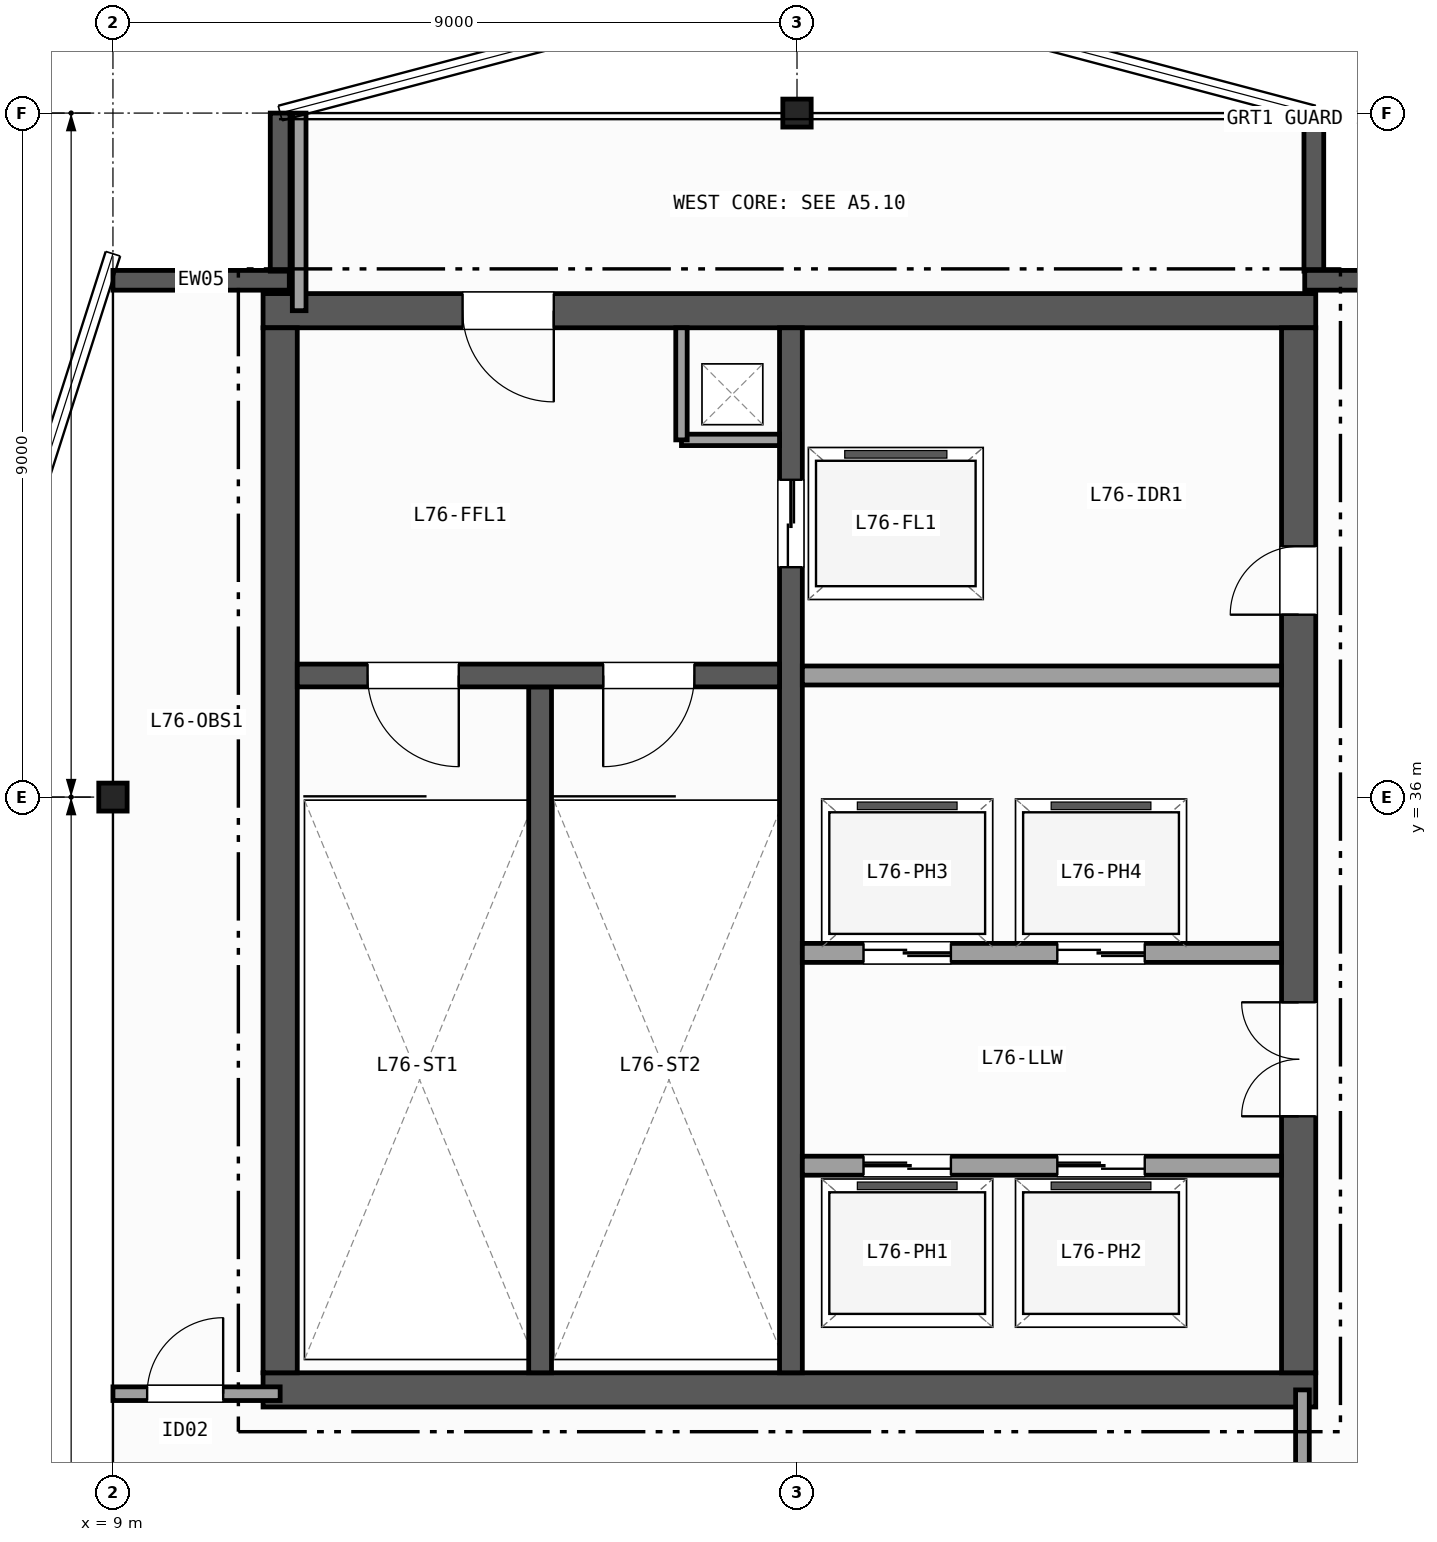
"""IFC4 building model, lengths in metres.
Left out: names, types, materials, properties, quantities, classifications, styles, units other than length and angle.
Written with IfcOpenShell. Run it as: python <this file> out.ifc"""

import sys

from ifc_helpers import new_model, si_unit, direction, frame, frame_2d, origin, origin_2d, place, context, subcontext, project, spatial, rectangle, i_section, extrude, element, fill, save


model = new_model("IFC4")
c1 = context("Model", 3, precision=1e-05, world=origin(), true_north=direction((0.0, 1.0)))
c2 = subcontext(c1, "Body", "Model", "MODEL_VIEW")
j1 = project(units=[si_unit("LENGTHUNIT", "METRE"), si_unit("PLANEANGLEUNIT", "RADIAN")], contexts=[c1])
p1 = place(None, origin())
s1 = spatial("IfcSite", under=j1, at=p1, CompositionType="ELEMENT")
p2 = place(p1, origin())
s2 = spatial("IfcBuilding", under=s1, at=p2, CompositionType="ELEMENT")
p3 = place(p2, frame((0.0, 0.0, 302.6)))
s3 = spatial("IfcBuildingStorey", under=s2, at=p3, CompositionType="ELEMENT", Elevation=302.6)
for number, where, z_axis, x_axis in (
    (1, (9.0, 36.0, 0.0), (0.0, 0.0, 1.0), (1.0, 0.0, 0.0)),
    (2, (18.0, 45.0, 0.0), (0.0, 0.0, 1.0), (1.0, 0.0, 0.0)),
):
    element("IfcColumn", number, at=place(p3, frame(where, z_axis=z_axis, x_axis=x_axis)), inside=s3, PredefinedType="COLUMN", context=c2, shape_type="SweptSolid", body=[
        extrude(i_section(OverallWidth=0.373, OverallDepth=0.368, WebThickness=0.015, FlangeThickness=0.024, FilletRadius=0.015, at=origin_2d()), origin(), (0.0, 0.0, 1.0), 5.2),
    ])
p4 = place(p3, frame((9.0, 42.8, 0.0), z_axis=(0.0, 0.0, 1.0), x_axis=(1.0, 0.0, 0.0)))
e3 = element("IfcWall", 3, at=p4, inside=s3, PredefinedType="SOLIDWALL", context=c2, shape_type="SweptSolid", body=[
    extrude(rectangle(XDim=2.32, YDim=0.26, at=frame_2d((1.16, 0.0))), origin(), (0.0, 0.0, 1.0), 4.9),
])
for number, where, z_axis, x_axis in (
    (4, (11.2, 42.92, 0.0), (0.0, 0.0, 1.0), (0.0, 1.0, 0.0)),
    (5, (24.8, 45.0, 0.0), (0.0, 0.0, 1.0), (0.0, -1.0, 0.0)),
):
    element("IfcWall", number, at=place(p3, frame(where, z_axis=z_axis, x_axis=x_axis)), inside=s3, PredefinedType="SOLIDWALL", context=c2, shape_type="SweptSolid", body=[
        extrude(rectangle(XDim=2.08, YDim=0.26, at=frame_2d((1.04, 0.0))), origin(), (0.0, 0.0, 1.0), 4.9),
    ])
p5 = place(p3, frame((24.68, 42.8, 0.0), z_axis=(0.0, 0.0, 1.0), x_axis=(1.0, 0.0, 0.0)))
e6 = element("IfcWall", 6, at=p5, inside=s3, PredefinedType="SOLIDWALL", context=c2, shape_type="SweptSolid", body=[
    extrude(rectangle(XDim=2.32, YDim=0.26, at=frame_2d((1.16, 0.0))), origin(), (0.0, 0.0, 1.0), 4.9),
])
p6 = place(p3, frame((10.975, 28.2, 0.0), z_axis=(0.0, 0.0, 1.0), x_axis=(1.0, 0.0, 0.0)))
e7 = element("IfcWall", 7, at=p6, inside=s3, PredefinedType="SHEAR", context=c2, shape_type="SweptSolid", body=[
    extrude(rectangle(XDim=13.85, YDim=0.45, at=frame_2d((6.925, 0.0))), origin(), (0.0, 0.0, 1.0), 4.9),
])
p7 = place(p3, frame((24.825, 42.4, 0.0), z_axis=(0.0, 0.0, 1.0), x_axis=(-1.0, 0.0, 0.0)))
e8 = element("IfcWall", 8, at=p7, inside=s3, PredefinedType="SHEAR", context=c2, shape_type="SweptSolid", body=[
    extrude(rectangle(XDim=13.85, YDim=0.45, at=frame_2d((6.925, 0.0))), origin(), (0.0, 0.0, 1.0), 4.9),
])
p8 = place(p7, frame((10.025, 0.0, 0.0)))
e9 = element("IfcOpeningElement", 9, at=p8, cuts=e8, PredefinedType="OPENING", context=c2, shape_type="SweptSolid", body=[
    extrude(rectangle(XDim=1.2, YDim=2.15, at=frame_2d((0.6, 1.075))), frame((0.0, 0.235, 0.0), z_axis=(0.0, -1.0, 0.0), x_axis=(1.0, 0.0, 0.0)), (0.0, 0.0, 1.0), 0.47),
])
p9 = place(p3, frame((11.2, 42.175, 0.0), z_axis=(0.0, 0.0, 1.0), x_axis=(0.0, -1.0, 0.0)))
e10 = element("IfcWall", 10, at=p9, inside=s3, PredefinedType="SHEAR", context=c2, shape_type="SweptSolid", body=[
    extrude(rectangle(XDim=13.75, YDim=0.45, at=frame_2d((6.875, 0.0))), origin(), (0.0, 0.0, 1.0), 4.9),
])
p10 = place(p3, frame((24.6, 28.425, 0.0), z_axis=(0.0, 0.0, 1.0), x_axis=(0.0, 1.0, 0.0)))
e11 = element("IfcWall", 11, at=p10, inside=s3, PredefinedType="SHEAR", context=c2, shape_type="SweptSolid", body=[
    extrude(rectangle(XDim=13.75, YDim=0.45, at=frame_2d((6.875, 0.0))), origin(), (0.0, 0.0, 1.0), 4.9),
])
p11 = place(p10, frame((3.375, 0.0, 0.0)))
e12 = element("IfcOpeningElement", 12, at=p11, cuts=e11, PredefinedType="OPENING", context=c2, shape_type="SweptSolid", body=[
    extrude(rectangle(XDim=1.5, YDim=2.2, at=frame_2d((0.75, 1.1))), frame((0.0, 0.235, 0.0), z_axis=(0.0, -1.0, 0.0), x_axis=(1.0, 0.0, 0.0)), (0.0, 0.0, 1.0), 0.47),
])
p12 = place(p10, frame((9.975, 0.0, 0.0)))
e13 = element("IfcOpeningElement", 13, at=p12, cuts=e11, PredefinedType="OPENING", context=c2, shape_type="SweptSolid", body=[
    extrude(rectangle(XDim=0.9, YDim=2.1, at=frame_2d((0.45, 1.05))), frame((0.0, 0.235, 0.0), z_axis=(0.0, -1.0, 0.0), x_axis=(1.0, 0.0, 0.0)), (0.0, 0.0, 1.0), 0.47),
])
p13 = place(p3, frame((14.62, 28.425, 0.0), z_axis=(0.0, 0.0, 1.0), x_axis=(0.0, 1.0, 0.0)))
e14 = element("IfcWall", 14, at=p13, inside=s3, PredefinedType="SHEAR", context=c2, shape_type="SweptSolid", body=[
    extrude(rectangle(XDim=9.025, YDim=0.3, at=frame_2d((4.512, 0.0))), origin(), (0.0, 0.0, 1.0), 4.9),
])
p14 = place(p3, frame((17.92, 42.175, 0.0), z_axis=(0.0, 0.0, 1.0), x_axis=(0.0, -1.0, 0.0)))
e15 = element("IfcWall", 15, at=p14, inside=s3, PredefinedType="SHEAR", context=c2, shape_type="SweptSolid", body=[
    extrude(rectangle(XDim=13.75, YDim=0.3, at=frame_2d((6.875, 0.0))), origin(), (0.0, 0.0, 1.0), 4.9),
])
p15 = place(p14, frame((2.0, 0.0, 0.0)))
e16 = element("IfcOpeningElement", 16, at=p15, cuts=e15, PredefinedType="OPENING", context=c2, shape_type="SweptSolid", body=[
    extrude(rectangle(XDim=1.15, YDim=2.15, at=frame_2d((0.575, 1.075))), frame((0.0, 0.16, 0.0), z_axis=(0.0, -1.0, 0.0), x_axis=(1.0, 0.0, 0.0)), (0.0, 0.0, 1.0), 0.32),
])
p16 = place(p3, frame((17.77, 37.6, 0.0), z_axis=(0.0, 0.0, 1.0), x_axis=(-1.0, 0.0, 0.0)))
e17 = element("IfcWall", 17, at=p16, inside=s3, PredefinedType="SHEAR", context=c2, shape_type="SweptSolid", body=[
    extrude(rectangle(XDim=6.345, YDim=0.3, at=frame_2d((3.172, 0.0))), origin(), (0.0, 0.0, 1.0), 4.9),
])
p17 = place(p16, frame((4.22, 0.0, 0.0)))
e18 = element("IfcOpeningElement", 18, at=p17, cuts=e17, PredefinedType="OPENING", context=c2, shape_type="SweptSolid", body=[
    extrude(rectangle(XDim=1.2, YDim=2.15, at=frame_2d((0.6, 1.075))), frame((0.0, 0.16, 0.0), z_axis=(0.0, -1.0, 0.0), x_axis=(1.0, 0.0, 0.0)), (0.0, 0.0, 1.0), 0.32),
])
p18 = place(p16, frame((1.12, 0.0, 0.0)))
e19 = element("IfcOpeningElement", 19, at=p18, cuts=e17, PredefinedType="OPENING", context=c2, shape_type="SweptSolid", body=[
    extrude(rectangle(XDim=1.2, YDim=2.15, at=frame_2d((0.6, 1.075))), frame((0.0, 0.16, 0.0), z_axis=(0.0, -1.0, 0.0), x_axis=(1.0, 0.0, 0.0)), (0.0, 0.0, 1.0), 0.32),
])
p19 = place(p3, frame((16.48, 40.7, 0.0), z_axis=(0.0, 0.0, 1.0), x_axis=(1.0, 0.0, 0.0)))
e20 = element("IfcWall", 20, at=p19, inside=s3, PredefinedType="PARTITIONING", context=c2, shape_type="SweptSolid", body=[
    extrude(rectangle(XDim=1.29, YDim=0.15, at=frame_2d((0.645, 0.0))), origin(), (0.0, 0.0, 1.0), 4.9),
])
p20 = place(p3, frame((16.48, 40.7, 0.0), z_axis=(0.0, 0.0, 1.0), x_axis=(0.0, 1.0, 0.0)))
e21 = element("IfcWall", 21, at=p20, inside=s3, PredefinedType="PARTITIONING", context=c2, shape_type="SweptSolid", body=[
    extrude(rectangle(XDim=1.475, YDim=0.15, at=frame_2d((0.738, 0.0))), origin(), (0.0, 0.0, 1.0), 4.9),
])
p21 = place(p3, frame((18.07, 37.6, 0.0), z_axis=(0.0, 0.0, 1.0), x_axis=(1.0, 0.0, 0.0)))
e22 = element("IfcWall", 22, at=p21, inside=s3, PredefinedType="PARTITIONING", context=c2, shape_type="SweptSolid", body=[
    extrude(rectangle(XDim=6.305, YDim=0.25, at=frame_2d((3.152, 0.0))), origin(), (0.0, 0.0, 1.0), 4.9),
])
p22 = place(p3, frame((18.07, 31.15, 0.0), z_axis=(0.0, 0.0, 1.0), x_axis=(1.0, 0.0, 0.0)))
e23 = element("IfcWall", 23, at=p22, inside=s3, PredefinedType="PARTITIONING", context=c2, shape_type="SweptSolid", body=[
    extrude(rectangle(XDim=6.305, YDim=0.25, at=frame_2d((3.152, 0.0))), origin(), (0.0, 0.0, 1.0), 4.9),
])
p23 = place(p22, frame((0.805, 0.0, 0.0)))
e24 = element("IfcOpeningElement", 24, at=p23, cuts=e23, PredefinedType="OPENING", context=c2, shape_type="SweptSolid", body=[
    extrude(rectangle(XDim=1.15, YDim=2.15, at=frame_2d((0.575, 1.075))), frame((0.0, 0.135, 0.0), z_axis=(0.0, -1.0, 0.0), x_axis=(1.0, 0.0, 0.0)), (0.0, 0.0, 1.0), 0.27),
])
p24 = place(p22, frame((3.355, 0.0, 0.0)))
e25 = element("IfcOpeningElement", 25, at=p24, cuts=e23, PredefinedType="OPENING", context=c2, shape_type="SweptSolid", body=[
    extrude(rectangle(XDim=1.15, YDim=2.15, at=frame_2d((0.575, 1.075))), frame((0.0, 0.135, 0.0), z_axis=(0.0, -1.0, 0.0), x_axis=(1.0, 0.0, 0.0)), (0.0, 0.0, 1.0), 0.27),
])
p25 = place(p3, frame((24.375, 33.95, 0.0), z_axis=(0.0, 0.0, 1.0), x_axis=(-1.0, 0.0, 0.0)))
e26 = element("IfcWall", 26, at=p25, inside=s3, PredefinedType="PARTITIONING", context=c2, shape_type="SweptSolid", body=[
    extrude(rectangle(XDim=6.305, YDim=0.25, at=frame_2d((3.152, 0.0))), origin(), (0.0, 0.0, 1.0), 4.9),
])
p26 = place(p25, frame((4.35, 0.0, 0.0)))
e27 = element("IfcOpeningElement", 27, at=p26, cuts=e26, PredefinedType="OPENING", context=c2, shape_type="SweptSolid", body=[
    extrude(rectangle(XDim=1.15, YDim=2.15, at=frame_2d((0.575, 1.075))), frame((0.0, 0.135, 0.0), z_axis=(0.0, -1.0, 0.0), x_axis=(1.0, 0.0, 0.0)), (0.0, 0.0, 1.0), 0.27),
])
p27 = place(p25, frame((1.8, 0.0, 0.0)))
e28 = element("IfcOpeningElement", 28, at=p27, cuts=e26, PredefinedType="OPENING", context=c2, shape_type="SweptSolid", body=[
    extrude(rectangle(XDim=1.15, YDim=2.15, at=frame_2d((0.575, 1.075))), frame((0.0, 0.135, 0.0), z_axis=(0.0, -1.0, 0.0), x_axis=(1.0, 0.0, 0.0)), (0.0, 0.0, 1.0), 0.27),
])
p28 = place(p3, frame((24.65, 9.0, 0.0), z_axis=(0.0, 0.0, 1.0), x_axis=(0.0, 1.0, 0.0)))
e29 = element("IfcWall", 29, at=p28, inside=s3, PredefinedType="PARTITIONING", context=c2, shape_type="SweptSolid", body=[
    extrude(rectangle(XDim=19.2, YDim=0.18, at=frame_2d((9.6, 0.0))), origin(), (0.0, 0.0, 1.0), 4.187),
])
p29 = place(p28, frame((12.5, 0.0, 0.0)))
e30 = element("IfcOpeningElement", 30, at=p29, cuts=e29, PredefinedType="OPENING", context=c2, shape_type="SweptSolid", body=[
    extrude(rectangle(XDim=1.4, YDim=2.15, at=frame_2d((0.7, 1.075))), frame((0.0, 0.1, 0.0), z_axis=(0.0, -1.0, 0.0), x_axis=(1.0, 0.0, 0.0)), (0.0, 0.0, 1.0), 0.2),
])
p30 = place(p3, frame((9.0, 28.15, 0.0), z_axis=(0.0, 0.0, 1.0), x_axis=(1.0, 0.0, 0.0)))
e31 = element("IfcWall", 31, at=p30, inside=s3, PredefinedType="PARTITIONING", context=c2, shape_type="SweptSolid", body=[
    extrude(rectangle(XDim=2.2, YDim=0.18, at=frame_2d((1.1, 0.0))), origin(), (0.0, 0.0, 1.0), 4.187),
])
p31 = place(p30, frame((0.45, 0.0, 0.0)))
e32 = element("IfcOpeningElement", 32, at=p31, cuts=e31, PredefinedType="OPENING", context=c2, shape_type="SweptSolid", body=[
    extrude(rectangle(XDim=1.0, YDim=2.1, at=frame_2d((0.5, 1.05))), frame((0.0, 0.1, 0.0), z_axis=(0.0, -1.0, 0.0), x_axis=(1.0, 0.0, 0.0)), (0.0, 0.0, 1.0), 0.2),
])
p32 = place(p3, frame((11.45, 42.4, 0.0), z_axis=(0.0, 0.0, 1.0), x_axis=(0.0, 1.0, 0.0)))
e33 = element("IfcWall", 33, at=p32, inside=s3, PredefinedType="PARTITIONING", context=c2, shape_type="SweptSolid", body=[
    extrude(rectangle(XDim=2.6, YDim=0.18, at=frame_2d((1.3, 0.0))), origin(), (0.0, 0.0, 1.0), 4.9),
])
p33 = place(p17, origin())
e34 = element("IfcDoor", 34, at=p33, inside=s3, OperationType="SINGLE_SWING_LEFT", PredefinedType="DOOR", context=c2, shape_type="SweptSolid", body=[
    extrude(rectangle(XDim=1.2, YDim=2.15, at=frame_2d((0.6, 1.075))), frame((0.0, 0.025, 0.0), z_axis=(0.0, -1.0, 0.0), x_axis=(1.0, 0.0, 0.0)), (0.0, 0.0, 1.0), 0.05),
])
fill(e18, e34)
p34 = place(p18, origin())
e35 = element("IfcDoor", 35, at=p34, inside=s3, OperationType="SINGLE_SWING_RIGHT", PredefinedType="DOOR", context=c2, shape_type="SweptSolid", body=[
    extrude(rectangle(XDim=1.2, YDim=2.15, at=frame_2d((0.6, 1.075))), frame((0.0, 0.025, 0.0), z_axis=(0.0, -1.0, 0.0), x_axis=(1.0, 0.0, 0.0)), (0.0, 0.0, 1.0), 0.05),
])
fill(e19, e35)
p35 = place(p11, origin())
e36 = element("IfcDoor", 36, at=p35, inside=s3, OperationType="DOUBLE_DOOR_SINGLE_SWING", PredefinedType="DOOR", context=c2, shape_type="SweptSolid", body=[
    extrude(rectangle(XDim=1.5, YDim=2.2, at=frame_2d((0.75, 1.1))), frame((0.0, 0.025, 0.0), z_axis=(0.0, -1.0, 0.0), x_axis=(1.0, 0.0, 0.0)), (0.0, 0.0, 1.0), 0.05),
])
fill(e12, e36)
p36 = place(p8, origin())
e37 = element("IfcDoor", 37, at=p36, inside=s3, OperationType="SINGLE_SWING_LEFT", PredefinedType="DOOR", context=c2, shape_type="SweptSolid", body=[
    extrude(rectangle(XDim=1.2, YDim=2.15, at=frame_2d((0.6, 1.075))), frame((0.0, 0.025, 0.0), z_axis=(0.0, -1.0, 0.0), x_axis=(1.0, 0.0, 0.0)), (0.0, 0.0, 1.0), 0.05),
])
fill(e9, e37)
p37 = place(p12, origin())
e38 = element("IfcDoor", 38, at=p37, inside=s3, OperationType="SINGLE_SWING_LEFT", PredefinedType="DOOR", context=c2, shape_type="SweptSolid", body=[
    extrude(rectangle(XDim=0.9, YDim=2.1, at=frame_2d((0.45, 1.05))), frame((0.0, 0.025, 0.0), z_axis=(0.0, -1.0, 0.0), x_axis=(1.0, 0.0, 0.0)), (0.0, 0.0, 1.0), 0.05),
])
fill(e13, e38)
p38 = place(p15, origin())
e39 = element("IfcDoor", 39, at=p38, inside=s3, OperationType="DOUBLE_DOOR_SLIDING", PredefinedType="DOOR", context=c2, shape_type="SweptSolid", body=[
    extrude(rectangle(XDim=1.15, YDim=2.15, at=frame_2d((0.575, 1.075))), frame((0.0, 0.025, 0.0), z_axis=(0.0, -1.0, 0.0), x_axis=(1.0, 0.0, 0.0)), (0.0, 0.0, 1.0), 0.05),
])
fill(e16, e39)
p39 = place(p23, origin())
e40 = element("IfcDoor", 40, at=p39, inside=s3, OperationType="DOUBLE_DOOR_SLIDING", PredefinedType="DOOR", context=c2, shape_type="SweptSolid", body=[
    extrude(rectangle(XDim=1.15, YDim=2.15, at=frame_2d((0.575, 1.075))), frame((0.0, 0.025, 0.0), z_axis=(0.0, -1.0, 0.0), x_axis=(1.0, 0.0, 0.0)), (0.0, 0.0, 1.0), 0.05),
])
fill(e24, e40)
p40 = place(p24, origin())
e41 = element("IfcDoor", 41, at=p40, inside=s3, OperationType="DOUBLE_DOOR_SLIDING", PredefinedType="DOOR", context=c2, shape_type="SweptSolid", body=[
    extrude(rectangle(XDim=1.15, YDim=2.15, at=frame_2d((0.575, 1.075))), frame((0.0, 0.025, 0.0), z_axis=(0.0, -1.0, 0.0), x_axis=(1.0, 0.0, 0.0)), (0.0, 0.0, 1.0), 0.05),
])
fill(e25, e41)
p41 = place(p26, origin())
e42 = element("IfcDoor", 42, at=p41, inside=s3, OperationType="DOUBLE_DOOR_SLIDING", PredefinedType="DOOR", context=c2, shape_type="SweptSolid", body=[
    extrude(rectangle(XDim=1.15, YDim=2.15, at=frame_2d((0.575, 1.075))), frame((0.0, 0.025, 0.0), z_axis=(0.0, -1.0, 0.0), x_axis=(1.0, 0.0, 0.0)), (0.0, 0.0, 1.0), 0.05),
])
fill(e27, e42)
p42 = place(p27, origin())
e43 = element("IfcDoor", 43, at=p42, inside=s3, OperationType="DOUBLE_DOOR_SLIDING", PredefinedType="DOOR", context=c2, shape_type="SweptSolid", body=[
    extrude(rectangle(XDim=1.15, YDim=2.15, at=frame_2d((0.575, 1.075))), frame((0.0, 0.025, 0.0), z_axis=(0.0, -1.0, 0.0), x_axis=(1.0, 0.0, 0.0)), (0.0, 0.0, 1.0), 0.05),
])
fill(e28, e43)
p43 = place(p31, origin())
e44 = element("IfcDoor", 44, at=p43, inside=s3, OperationType="SINGLE_SWING_RIGHT", PredefinedType="DOOR", context=c2, shape_type="SweptSolid", body=[
    extrude(rectangle(XDim=1.0, YDim=2.1, at=frame_2d((0.5, 1.05))), frame((0.0, 0.025, 0.0), z_axis=(0.0, -1.0, 0.0), x_axis=(1.0, 0.0, 0.0)), (0.0, 0.0, 1.0), 0.05),
])
fill(e32, e44)
save(model, sys.argv[1])
